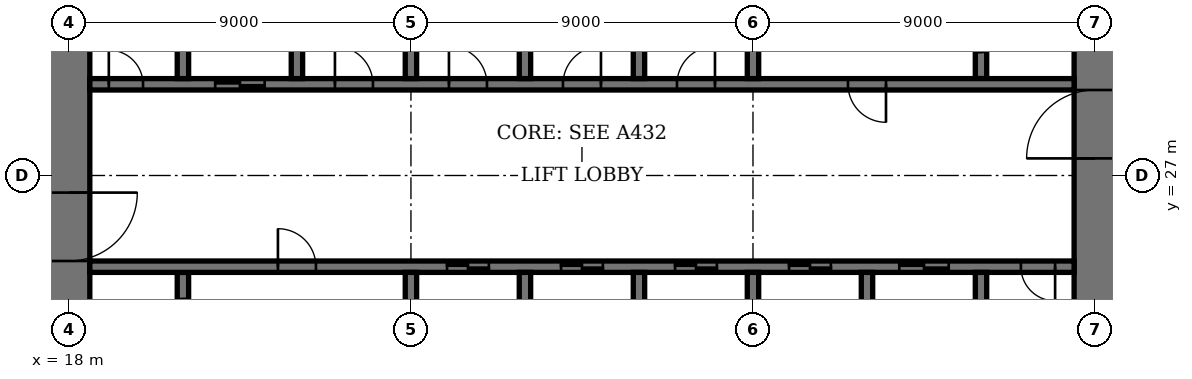
"""IFC4 building model, lengths in metres.
Left out: names, types, materials, properties, quantities, classifications, styles, units other than length and angle.
Written with IfcOpenShell. Run it as: python <this file> out.ifc"""

import sys

from ifc_helpers import new_model, si_unit, direction, frame, frame_2d, origin, place, context, subcontext, project, spatial, rectangle, extrude, element, fill, save


model = new_model("IFC4")
c1 = context("Model", 3, precision=1e-05, world=origin(), true_north=direction((0.0, 1.0)))
c2 = subcontext(c1, "Body", "Model", "MODEL_VIEW")
j1 = project(units=[si_unit("LENGTHUNIT", "METRE"), si_unit("PLANEANGLEUNIT", "RADIAN")], contexts=[c1])
p1 = place(None, origin())
s1 = spatial("IfcSite", under=j1, at=p1, CompositionType="ELEMENT")
p2 = place(p1, origin())
s2 = spatial("IfcBuilding", under=s1, at=p2, CompositionType="ELEMENT")
p3 = place(p2, frame((0.0, 0.0, 239.4)))
s3 = spatial("IfcBuildingStorey", under=s2, at=p3, CompositionType="ELEMENT", Elevation=239.4)
p4 = place(p3, frame((18.0, 35.45, 0.0), z_axis=(0.0, 0.0, 1.0), x_axis=(0.0, -1.0, 0.0)))
e1 = element("IfcWall", 1, at=p4, inside=s3, PredefinedType="SHEAR", context=c2, shape_type="SweptSolid", body=[
    extrude(rectangle(XDim=16.9, YDim=1.1, at=frame_2d((8.45, 0.0))), origin(), (0.0, 0.0, 1.0), 4.0),
])
p5 = place(p4, frame((8.9, 0.0, 0.0)))
e2 = element("IfcOpeningElement", 2, at=p5, cuts=e1, PredefinedType="OPENING", context=c2, shape_type="SweptSolid", body=[
    extrude(rectangle(XDim=1.8, YDim=2.4, at=frame_2d((0.9, 1.2))), frame((0.0, 0.56, 0.0), z_axis=(0.0, -1.0, 0.0), x_axis=(1.0, 0.0, 0.0)), (0.0, 0.0, 1.0), 1.12),
])
p6 = place(p3, frame((45.0, 18.55, 0.0), z_axis=(0.0, 0.0, 1.0), x_axis=(0.0, 1.0, 0.0)))
e3 = element("IfcWall", 3, at=p6, inside=s3, PredefinedType="SHEAR", context=c2, shape_type="SweptSolid", body=[
    extrude(rectangle(XDim=16.9, YDim=1.1, at=frame_2d((8.45, 0.0))), origin(), (0.0, 0.0, 1.0), 4.0),
])
p7 = place(p6, frame((8.9, 0.0, 0.0)))
e4 = element("IfcOpeningElement", 4, at=p7, cuts=e3, PredefinedType="OPENING", context=c2, shape_type="SweptSolid", body=[
    extrude(rectangle(XDim=1.8, YDim=2.4, at=frame_2d((0.9, 1.2))), frame((0.0, 0.56, 0.0), z_axis=(0.0, -1.0, 0.0), x_axis=(1.0, 0.0, 0.0)), (0.0, 0.0, 1.0), 1.12),
])
p8 = place(p3, frame((21.0, 21.95, 0.0), z_axis=(0.0, 0.0, 1.0), x_axis=(0.0, 1.0, 0.0)))
e5 = element("IfcWall", 5, at=p8, inside=s3, PredefinedType="SHEAR", context=c2, shape_type="SweptSolid", body=[
    extrude(rectangle(XDim=2.5, YDim=0.3, at=frame_2d((1.25, 0.0))), origin(), (0.0, 0.0, 1.0), 4.0),
])
p9 = place(p8, frame((0.7, 0.0, 0.0)))
e6 = element("IfcOpeningElement", 6, at=p9, cuts=e5, PredefinedType="OPENING", context=c2, shape_type="SweptSolid", body=[
    extrude(rectangle(XDim=1.1, YDim=2.4, at=frame_2d((0.55, 1.2))), frame((0.0, 0.16, 0.0), z_axis=(0.0, -1.0, 0.0), x_axis=(1.0, 0.0, 0.0)), (0.0, 0.0, 1.0), 0.32),
])
p10 = place(p3, frame((42.0, 29.55, 0.0), z_axis=(0.0, 0.0, 1.0), x_axis=(0.0, 1.0, 0.0)))
e7 = element("IfcWall", 7, at=p10, inside=s3, PredefinedType="SHEAR", context=c2, shape_type="SweptSolid", body=[
    extrude(rectangle(XDim=2.5, YDim=0.3, at=frame_2d((1.25, 0.0))), origin(), (0.0, 0.0, 1.0), 4.0),
])
p11 = place(p10, frame((0.7, 0.0, 0.0)))
e8 = element("IfcOpeningElement", 8, at=p11, cuts=e7, PredefinedType="OPENING", context=c2, shape_type="SweptSolid", body=[
    extrude(rectangle(XDim=1.1, YDim=2.4, at=frame_2d((0.55, 1.2))), frame((0.0, 0.16, 0.0), z_axis=(0.0, -1.0, 0.0), x_axis=(1.0, 0.0, 0.0)), (0.0, 0.0, 1.0), 0.32),
])
p12 = place(p3, frame((18.55, 24.6, 0.0), z_axis=(0.0, 0.0, 1.0), x_axis=(1.0, 0.0, 0.0)))
e9 = element("IfcWall", 9, at=p12, inside=s3, PredefinedType="SHEAR", context=c2, shape_type="SweptSolid", body=[
    extrude(rectangle(XDim=25.9, YDim=0.3, at=frame_2d((12.95, 0.0))), origin(), (0.0, 0.0, 1.0), 4.0),
])
p13 = place(p12, frame((4.95, 0.0, 0.0)))
e10 = element("IfcOpeningElement", 10, at=p13, cuts=e9, PredefinedType="OPENING", context=c2, shape_type="SweptSolid", body=[
    extrude(rectangle(XDim=1.0, YDim=2.4, at=frame_2d((0.5, 1.2))), frame((0.0, 0.16, 0.0), z_axis=(0.0, -1.0, 0.0), x_axis=(1.0, 0.0, 0.0)), (0.0, 0.0, 1.0), 0.32),
])
p14 = place(p12, frame((24.5, 0.0, 0.0)))
e11 = element("IfcOpeningElement", 11, at=p14, cuts=e9, PredefinedType="OPENING", context=c2, shape_type="SweptSolid", body=[
    extrude(rectangle(XDim=0.9, YDim=2.1, at=frame_2d((0.45, 1.05))), frame((0.0, 0.16, 0.0), z_axis=(0.0, -1.0, 0.0), x_axis=(1.0, 0.0, 0.0)), (0.0, 0.0, 1.0), 0.32),
])
p15 = place(p12, frame((9.4, 0.0, 0.0)))
e12 = element("IfcOpeningElement", 12, at=p15, cuts=e9, PredefinedType="OPENING", context=c2, shape_type="SweptSolid", body=[
    extrude(rectangle(XDim=1.1, YDim=2.4, at=frame_2d((0.55, 1.2))), frame((0.0, 0.16, 0.0), z_axis=(0.0, -1.0, 0.0), x_axis=(1.0, 0.0, 0.0)), (0.0, 0.0, 1.0), 0.32),
])
p16 = place(p12, frame((12.4, 0.0, 0.0)))
e13 = element("IfcOpeningElement", 13, at=p16, cuts=e9, PredefinedType="OPENING", context=c2, shape_type="SweptSolid", body=[
    extrude(rectangle(XDim=1.1, YDim=2.4, at=frame_2d((0.55, 1.2))), frame((0.0, 0.16, 0.0), z_axis=(0.0, -1.0, 0.0), x_axis=(1.0, 0.0, 0.0)), (0.0, 0.0, 1.0), 0.32),
])
p17 = place(p12, frame((15.4, 0.0, 0.0)))
e14 = element("IfcOpeningElement", 14, at=p17, cuts=e9, PredefinedType="OPENING", context=c2, shape_type="SweptSolid", body=[
    extrude(rectangle(XDim=1.1, YDim=2.4, at=frame_2d((0.55, 1.2))), frame((0.0, 0.16, 0.0), z_axis=(0.0, -1.0, 0.0), x_axis=(1.0, 0.0, 0.0)), (0.0, 0.0, 1.0), 0.32),
])
p18 = place(p12, frame((18.4, 0.0, 0.0)))
e15 = element("IfcOpeningElement", 15, at=p18, cuts=e9, PredefinedType="OPENING", context=c2, shape_type="SweptSolid", body=[
    extrude(rectangle(XDim=1.1, YDim=2.4, at=frame_2d((0.55, 1.2))), frame((0.0, 0.16, 0.0), z_axis=(0.0, -1.0, 0.0), x_axis=(1.0, 0.0, 0.0)), (0.0, 0.0, 1.0), 0.32),
])
p19 = place(p12, frame((21.3, 0.0, 0.0)))
e16 = element("IfcOpeningElement", 16, at=p19, cuts=e9, PredefinedType="OPENING", context=c2, shape_type="SweptSolid", body=[
    extrude(rectangle(XDim=1.3, YDim=2.4, at=frame_2d((0.65, 1.2))), frame((0.0, 0.16, 0.0), z_axis=(0.0, -1.0, 0.0), x_axis=(1.0, 0.0, 0.0)), (0.0, 0.0, 1.0), 0.32),
])
p20 = place(p3, frame((18.55, 29.4, 0.0), z_axis=(0.0, 0.0, 1.0), x_axis=(1.0, 0.0, 0.0)))
e17 = element("IfcWall", 17, at=p20, inside=s3, PredefinedType="SHEAR", context=c2, shape_type="SweptSolid", body=[
    extrude(rectangle(XDim=25.9, YDim=0.3, at=frame_2d((12.95, 0.0))), origin(), (0.0, 0.0, 1.0), 4.0),
])
p21 = place(p20, frame((19.95, 0.0, 0.0)))
e18 = element("IfcOpeningElement", 18, at=p21, cuts=e17, PredefinedType="OPENING", context=c2, shape_type="SweptSolid", body=[
    extrude(rectangle(XDim=1.0, YDim=2.4, at=frame_2d((0.5, 1.2))), frame((0.0, 0.16, 0.0), z_axis=(0.0, -1.0, 0.0), x_axis=(1.0, 0.0, 0.0)), (0.0, 0.0, 1.0), 0.32),
])
p22 = place(p20, frame((0.5, 0.0, 0.0)))
e19 = element("IfcOpeningElement", 19, at=p22, cuts=e17, PredefinedType="OPENING", context=c2, shape_type="SweptSolid", body=[
    extrude(rectangle(XDim=0.9, YDim=2.1, at=frame_2d((0.45, 1.05))), frame((0.0, 0.16, 0.0), z_axis=(0.0, -1.0, 0.0), x_axis=(1.0, 0.0, 0.0)), (0.0, 0.0, 1.0), 0.32),
])
p23 = place(p20, frame((15.45, 0.0, 0.0)))
e20 = element("IfcOpeningElement", 20, at=p23, cuts=e17, PredefinedType="OPENING", context=c2, shape_type="SweptSolid", body=[
    extrude(rectangle(XDim=1.0, YDim=2.4, at=frame_2d((0.5, 1.2))), frame((0.0, 0.16, 0.0), z_axis=(0.0, -1.0, 0.0), x_axis=(1.0, 0.0, 0.0)), (0.0, 0.0, 1.0), 0.32),
])
p24 = place(p20, frame((12.45, 0.0, 0.0)))
e21 = element("IfcOpeningElement", 21, at=p24, cuts=e17, PredefinedType="OPENING", context=c2, shape_type="SweptSolid", body=[
    extrude(rectangle(XDim=1.0, YDim=2.4, at=frame_2d((0.5, 1.2))), frame((0.0, 0.16, 0.0), z_axis=(0.0, -1.0, 0.0), x_axis=(1.0, 0.0, 0.0)), (0.0, 0.0, 1.0), 0.32),
])
p25 = place(p20, frame((9.45, 0.0, 0.0)))
e22 = element("IfcOpeningElement", 22, at=p25, cuts=e17, PredefinedType="OPENING", context=c2, shape_type="SweptSolid", body=[
    extrude(rectangle(XDim=1.0, YDim=2.4, at=frame_2d((0.5, 1.2))), frame((0.0, 0.16, 0.0), z_axis=(0.0, -1.0, 0.0), x_axis=(1.0, 0.0, 0.0)), (0.0, 0.0, 1.0), 0.32),
])
p26 = place(p20, frame((6.45, 0.0, 0.0)))
e23 = element("IfcOpeningElement", 23, at=p26, cuts=e17, PredefinedType="OPENING", context=c2, shape_type="SweptSolid", body=[
    extrude(rectangle(XDim=1.0, YDim=2.4, at=frame_2d((0.5, 1.2))), frame((0.0, 0.16, 0.0), z_axis=(0.0, -1.0, 0.0), x_axis=(1.0, 0.0, 0.0)), (0.0, 0.0, 1.0), 0.32),
])
p27 = place(p20, frame((3.3, 0.0, 0.0)))
e24 = element("IfcOpeningElement", 24, at=p27, cuts=e17, PredefinedType="OPENING", context=c2, shape_type="SweptSolid", body=[
    extrude(rectangle(XDim=1.3, YDim=2.4, at=frame_2d((0.65, 1.2))), frame((0.0, 0.16, 0.0), z_axis=(0.0, -1.0, 0.0), x_axis=(1.0, 0.0, 0.0)), (0.0, 0.0, 1.0), 0.32),
])
for number, where, z_axis, x_axis in (
    (25, (30.0, 21.75, 0.0), (0.0, 0.0, 1.0), (0.0, 1.0, 0.0)),
    (26, (33.0, 29.55, 0.0), (0.0, 0.0, 1.0), (0.0, 1.0, 0.0)),
    (27, (33.0, 21.75, 0.0), (0.0, 0.0, 1.0), (0.0, 1.0, 0.0)),
    (28, (30.0, 29.55, 0.0), (0.0, 0.0, 1.0), (0.0, 1.0, 0.0)),
    (29, (36.0, 21.75, 0.0), (0.0, 0.0, 1.0), (0.0, 1.0, 0.0)),
    (30, (27.0, 29.55, 0.0), (0.0, 0.0, 1.0), (0.0, 1.0, 0.0)),
):
    element("IfcWall", number, at=place(p3, frame(where, z_axis=z_axis, x_axis=x_axis)), inside=s3, PredefinedType="SHEAR", context=c2, shape_type="SweptSolid", body=[
        extrude(rectangle(XDim=2.7, YDim=0.3, at=frame_2d((1.35, 0.0))), origin(), (0.0, 0.0, 1.0), 4.0),
    ])
for number, where, z_axis, x_axis in (
    (31, (39.0, 18.55, 0.0), (0.0, 0.0, 1.0), (0.0, 1.0, 0.0)),
    (32, (24.0, 29.55, 0.0), (0.0, 0.0, 1.0), (0.0, 1.0, 0.0)),
):
    element("IfcWall", number, at=place(p3, frame(where, z_axis=z_axis, x_axis=x_axis)), inside=s3, PredefinedType="SHEAR", context=c2, shape_type="SweptSolid", body=[
        extrude(rectangle(XDim=5.9, YDim=0.3, at=frame_2d((2.95, 0.0))), origin(), (0.0, 0.0, 1.0), 4.0),
    ])
for number, where, z_axis, x_axis in (
    (33, (42.0, 21.75, 0.0), (0.0, 0.0, 1.0), (0.0, 1.0, 0.0)),
    (34, (21.0, 29.55, 0.0), (0.0, 0.0, 1.0), (0.0, 1.0, 0.0)),
):
    element("IfcWall", number, at=place(p3, frame(where, z_axis=z_axis, x_axis=x_axis)), inside=s3, PredefinedType="SHEAR", context=c2, shape_type="SweptSolid", body=[
        extrude(rectangle(XDim=2.7, YDim=0.3, at=frame_2d((1.35, 0.0))), origin(), (0.0, 0.0, 1.0), 4.0),
    ])
for number, where, z_axis, x_axis in (
    (35, (27.0, 21.6, 0.0), (0.0, 0.0, 1.0), (0.0, 1.0, 0.0)),
    (36, (36.0, 29.55, 0.0), (0.0, 0.0, 1.0), (0.0, 1.0, 0.0)),
):
    element("IfcWall", number, at=place(p3, frame(where, z_axis=z_axis, x_axis=x_axis)), inside=s3, PredefinedType="SHEAR", context=c2, shape_type="SweptSolid", body=[
        extrude(rectangle(XDim=2.85, YDim=0.3, at=frame_2d((1.425, 0.0))), origin(), (0.0, 0.0, 1.0), 4.0),
    ])
p28 = place(p5, origin())
e37 = element("IfcDoor", 37, at=p28, inside=s3, OperationType="DOUBLE_DOOR_DOUBLE_SWING", PredefinedType="DOOR", context=c2, shape_type="SweptSolid", body=[
    extrude(rectangle(XDim=1.8, YDim=2.4, at=frame_2d((0.9, 1.2))), frame((0.0, 0.03, 0.0), z_axis=(0.0, -1.0, 0.0), x_axis=(1.0, 0.0, 0.0)), (0.0, 0.0, 1.0), 0.06),
    extrude(rectangle(XDim=0.04, YDim=2.4, at=frame_2d((0.02, 1.2))), frame((0.0, 0.55, 0.0), z_axis=(0.0, -1.0, 0.0), x_axis=(1.0, 0.0, 0.0)), (0.0, 0.0, 1.0), 1.1),
    extrude(rectangle(XDim=0.04, YDim=2.4, at=frame_2d((1.78, 1.2))), frame((0.0, 0.55, 0.0), z_axis=(0.0, -1.0, 0.0), x_axis=(1.0, 0.0, 0.0)), (0.0, 0.0, 1.0), 1.1),
    extrude(rectangle(XDim=1.8, YDim=0.04, at=frame_2d((0.9, 2.38))), frame((0.0, 0.55, 0.0), z_axis=(0.0, -1.0, 0.0), x_axis=(1.0, 0.0, 0.0)), (0.0, 0.0, 1.0), 1.1),
])
fill(e2, e37)
p29 = place(p7, origin())
e38 = element("IfcDoor", 38, at=p29, inside=s3, OperationType="DOUBLE_DOOR_DOUBLE_SWING", PredefinedType="DOOR", context=c2, shape_type="SweptSolid", body=[
    extrude(rectangle(XDim=1.8, YDim=2.4, at=frame_2d((0.9, 1.2))), frame((0.0, 0.03, 0.0), z_axis=(0.0, -1.0, 0.0), x_axis=(1.0, 0.0, 0.0)), (0.0, 0.0, 1.0), 0.06),
    extrude(rectangle(XDim=0.04, YDim=2.4, at=frame_2d((0.02, 1.2))), frame((0.0, 0.55, 0.0), z_axis=(0.0, -1.0, 0.0), x_axis=(1.0, 0.0, 0.0)), (0.0, 0.0, 1.0), 1.1),
    extrude(rectangle(XDim=0.04, YDim=2.4, at=frame_2d((1.78, 1.2))), frame((0.0, 0.55, 0.0), z_axis=(0.0, -1.0, 0.0), x_axis=(1.0, 0.0, 0.0)), (0.0, 0.0, 1.0), 1.1),
    extrude(rectangle(XDim=1.8, YDim=0.04, at=frame_2d((0.9, 2.38))), frame((0.0, 0.55, 0.0), z_axis=(0.0, -1.0, 0.0), x_axis=(1.0, 0.0, 0.0)), (0.0, 0.0, 1.0), 1.1),
])
fill(e4, e38)
p30 = place(p13, origin())
e39 = element("IfcDoor", 39, at=p30, inside=s3, OperationType="SINGLE_SWING_RIGHT", PredefinedType="DOOR", context=c2, shape_type="SweptSolid", body=[
    extrude(rectangle(XDim=1.0, YDim=2.4, at=frame_2d((0.5, 1.2))), frame((0.0, 0.03, 0.0), z_axis=(0.0, -1.0, 0.0), x_axis=(1.0, 0.0, 0.0)), (0.0, 0.0, 1.0), 0.06),
])
fill(e10, e39)
p31 = place(p21, origin())
e40 = element("IfcDoor", 40, at=p31, inside=s3, OperationType="SINGLE_SWING_RIGHT", PredefinedType="DOOR", context=c2, shape_type="SweptSolid", body=[
    extrude(rectangle(XDim=1.0, YDim=2.4, at=frame_2d((0.5, 1.2))), frame((0.0, 0.03, 0.0), z_axis=(0.0, -1.0, 0.0), x_axis=(1.0, 0.0, 0.0)), (0.0, 0.0, 1.0), 0.06),
])
fill(e18, e40)
p32 = place(p14, origin())
e41 = element("IfcDoor", 41, at=p32, inside=s3, OperationType="SINGLE_SWING_RIGHT", PredefinedType="DOOR", context=c2, shape_type="SweptSolid", body=[
    extrude(rectangle(XDim=0.9, YDim=2.1, at=frame_2d((0.45, 1.05))), frame((0.0, 0.03, 0.0), z_axis=(0.0, -1.0, 0.0), x_axis=(1.0, 0.0, 0.0)), (0.0, 0.0, 1.0), 0.06),
])
fill(e11, e41)
p33 = place(p22, origin())
e42 = element("IfcDoor", 42, at=p33, inside=s3, OperationType="SINGLE_SWING_RIGHT", PredefinedType="DOOR", context=c2, shape_type="SweptSolid", body=[
    extrude(rectangle(XDim=0.9, YDim=2.1, at=frame_2d((0.45, 1.05))), frame((0.0, 0.03, 0.0), z_axis=(0.0, -1.0, 0.0), x_axis=(1.0, 0.0, 0.0)), (0.0, 0.0, 1.0), 0.06),
])
fill(e19, e42)
p34 = place(p15, origin())
e43 = element("IfcDoor", 43, at=p34, inside=s3, OperationType="DOUBLE_DOOR_SLIDING", PredefinedType="DOOR", context=c2, shape_type="SweptSolid", body=[
    extrude(rectangle(XDim=1.1, YDim=2.4, at=frame_2d((0.55, 1.2))), frame((0.0, 0.02, 0.0), z_axis=(0.0, -1.0, 0.0), x_axis=(1.0, 0.0, 0.0)), (0.0, 0.0, 1.0), 0.04),
])
fill(e12, e43)
p35 = place(p16, origin())
e44 = element("IfcDoor", 44, at=p35, inside=s3, OperationType="DOUBLE_DOOR_SLIDING", PredefinedType="DOOR", context=c2, shape_type="SweptSolid", body=[
    extrude(rectangle(XDim=1.1, YDim=2.4, at=frame_2d((0.55, 1.2))), frame((0.0, 0.02, 0.0), z_axis=(0.0, -1.0, 0.0), x_axis=(1.0, 0.0, 0.0)), (0.0, 0.0, 1.0), 0.04),
])
fill(e13, e44)
p36 = place(p17, origin())
e45 = element("IfcDoor", 45, at=p36, inside=s3, OperationType="DOUBLE_DOOR_SLIDING", PredefinedType="DOOR", context=c2, shape_type="SweptSolid", body=[
    extrude(rectangle(XDim=1.1, YDim=2.4, at=frame_2d((0.55, 1.2))), frame((0.0, 0.02, 0.0), z_axis=(0.0, -1.0, 0.0), x_axis=(1.0, 0.0, 0.0)), (0.0, 0.0, 1.0), 0.04),
])
fill(e14, e45)
p37 = place(p18, origin())
e46 = element("IfcDoor", 46, at=p37, inside=s3, OperationType="DOUBLE_DOOR_SLIDING", PredefinedType="DOOR", context=c2, shape_type="SweptSolid", body=[
    extrude(rectangle(XDim=1.1, YDim=2.4, at=frame_2d((0.55, 1.2))), frame((0.0, 0.02, 0.0), z_axis=(0.0, -1.0, 0.0), x_axis=(1.0, 0.0, 0.0)), (0.0, 0.0, 1.0), 0.04),
])
fill(e15, e46)
p38 = place(p23, origin())
e47 = element("IfcDoor", 47, at=p38, inside=s3, OperationType="SINGLE_SWING_LEFT", PredefinedType="DOOR", context=c2, shape_type="SweptSolid", body=[
    extrude(rectangle(XDim=1.0, YDim=2.4, at=frame_2d((0.5, 1.2))), frame((0.0, 0.03, 0.0), z_axis=(0.0, -1.0, 0.0), x_axis=(1.0, 0.0, 0.0)), (0.0, 0.0, 1.0), 0.06),
])
fill(e20, e47)
p39 = place(p24, origin())
e48 = element("IfcDoor", 48, at=p39, inside=s3, OperationType="SINGLE_SWING_LEFT", PredefinedType="DOOR", context=c2, shape_type="SweptSolid", body=[
    extrude(rectangle(XDim=1.0, YDim=2.4, at=frame_2d((0.5, 1.2))), frame((0.0, 0.03, 0.0), z_axis=(0.0, -1.0, 0.0), x_axis=(1.0, 0.0, 0.0)), (0.0, 0.0, 1.0), 0.06),
])
fill(e21, e48)
p40 = place(p25, origin())
e49 = element("IfcDoor", 49, at=p40, inside=s3, OperationType="SINGLE_SWING_RIGHT", PredefinedType="DOOR", context=c2, shape_type="SweptSolid", body=[
    extrude(rectangle(XDim=1.0, YDim=2.4, at=frame_2d((0.5, 1.2))), frame((0.0, 0.03, 0.0), z_axis=(0.0, -1.0, 0.0), x_axis=(1.0, 0.0, 0.0)), (0.0, 0.0, 1.0), 0.06),
])
fill(e22, e49)
p41 = place(p26, origin())
e50 = element("IfcDoor", 50, at=p41, inside=s3, OperationType="SINGLE_SWING_RIGHT", PredefinedType="DOOR", context=c2, shape_type="SweptSolid", body=[
    extrude(rectangle(XDim=1.0, YDim=2.4, at=frame_2d((0.5, 1.2))), frame((0.0, 0.03, 0.0), z_axis=(0.0, -1.0, 0.0), x_axis=(1.0, 0.0, 0.0)), (0.0, 0.0, 1.0), 0.06),
])
fill(e23, e50)
p42 = place(p19, origin())
e51 = element("IfcDoor", 51, at=p42, inside=s3, OperationType="DOUBLE_DOOR_SLIDING", PredefinedType="DOOR", context=c2, shape_type="SweptSolid", body=[
    extrude(rectangle(XDim=1.3, YDim=2.4, at=frame_2d((0.65, 1.2))), frame((0.0, 0.02, 0.0), z_axis=(0.0, -1.0, 0.0), x_axis=(1.0, 0.0, 0.0)), (0.0, 0.0, 1.0), 0.04),
])
fill(e16, e51)
p43 = place(p27, origin())
e52 = element("IfcDoor", 52, at=p43, inside=s3, OperationType="DOUBLE_DOOR_SLIDING", PredefinedType="DOOR", context=c2, shape_type="SweptSolid", body=[
    extrude(rectangle(XDim=1.3, YDim=2.4, at=frame_2d((0.65, 1.2))), frame((0.0, 0.02, 0.0), z_axis=(0.0, -1.0, 0.0), x_axis=(1.0, 0.0, 0.0)), (0.0, 0.0, 1.0), 0.04),
])
fill(e24, e52)
save(model, sys.argv[1])
